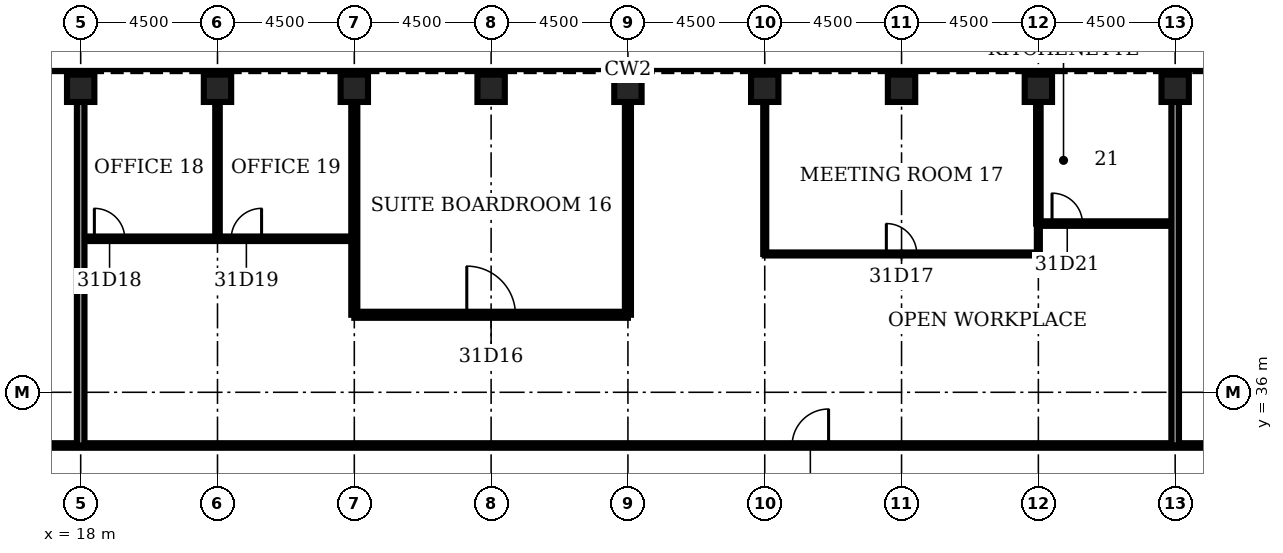
"""IFC4 building model, lengths in metres.
Left out: names, types, materials, properties, quantities, classifications, styles, units other than length and angle.
Written with IfcOpenShell. Run it as: python <this file> out.ifc"""

import sys

from ifc_helpers import new_model, si_unit, direction, frame, frame_2d, origin, origin_2d, place, context, subcontext, project, spatial, rectangle, hollow_rectangle, extrude, element, fill, save


model = new_model("IFC4")
c1 = context("Model", 3, precision=1e-05, world=origin(), true_north=direction((0.0, 1.0)))
c2 = subcontext(c1, "Body", "Model", "MODEL_VIEW")
j1 = project(units=[si_unit("LENGTHUNIT", "METRE"), si_unit("PLANEANGLEUNIT", "RADIAN")], contexts=[c1])
p1 = place(None, origin())
s1 = spatial("IfcSite", under=j1, at=p1, CompositionType="ELEMENT")
p2 = place(p1, origin())
s2 = spatial("IfcBuilding", under=s1, at=p2, CompositionType="ELEMENT")
p3 = place(p2, frame((0.0, 0.0, 142.5)))
s3 = spatial("IfcBuildingStorey", under=s2, at=p3, CompositionType="ELEMENT", Elevation=142.5)
for number, where, z_axis, x_axis in (
    (1, (54.0, 46.0, 0.0), (0.0, 0.0, 1.0), (0.0, 1.0, 0.0)),
    (2, (49.5, 46.0, 0.0), (0.0, 0.0, 1.0), (0.0, 1.0, 0.0)),
    (3, (45.0, 46.0, 0.0), (0.0, 0.0, 1.0), (0.0, 1.0, 0.0)),
    (4, (40.5, 46.0, 0.0), (0.0, 0.0, 1.0), (0.0, 1.0, 0.0)),
    (5, (36.0, 46.0, 0.0), (0.0, 0.0, 1.0), (0.0, 1.0, 0.0)),
    (6, (31.5, 46.0, 0.0), (0.0, 0.0, 1.0), (0.0, 1.0, 0.0)),
    (7, (27.0, 46.0, 0.0), (0.0, 0.0, 1.0), (0.0, 1.0, 0.0)),
    (8, (22.5, 46.0, 0.0), (0.0, 0.0, 1.0), (0.0, 1.0, 0.0)),
    (9, (18.0, 46.0, 0.0), (0.0, 0.0, 1.0), (0.0, 1.0, 0.0)),
):
    element("IfcColumn", number, at=place(p3, frame(where, z_axis=z_axis, x_axis=x_axis)), inside=s3, PredefinedType="COLUMN", context=c2, shape_type="SweptSolid", body=[
        extrude(hollow_rectangle(XDim=0.9, YDim=0.9, WallThickness=0.1, at=origin_2d()), origin(), (0.0, 0.0, 1.0), 4.2),
    ])
p4 = place(p3, frame((15.15, 34.25, 0.0), z_axis=(0.0, 0.0, 1.0), x_axis=(1.0, 0.0, 0.0)))
e10 = element("IfcWall", 10, at=p4, inside=s3, PredefinedType="PARTITIONING", context=c2, shape_type="SweptSolid", body=[
    extrude(rectangle(XDim=41.7, YDim=0.15, at=frame_2d((20.85, 0.0))), origin(), (0.0, 0.0, 1.0), 3.0),
])
p5 = place(p4, frame((26.25, 0.0, 0.0)))
e11 = element("IfcOpeningElement", 11, at=p5, cuts=e10, PredefinedType="OPENING", context=c2, shape_type="SweptSolid", body=[
    extrude(rectangle(XDim=1.2, YDim=2.1, at=frame_2d((0.6, 1.05))), frame((0.0, 0.085, 0.0), z_axis=(0.0, -1.0, 0.0), x_axis=(1.0, 0.0, 0.0)), (0.0, 0.0, 1.0), 0.17),
])
p6 = place(p3, frame((27.0, 38.55, 0.0), z_axis=(0.0, 0.0, 1.0), x_axis=(1.0, 0.0, 0.0)))
e12 = element("IfcWall", 12, at=p6, inside=s3, PredefinedType="PARTITIONING", context=c2, shape_type="SweptSolid", body=[
    extrude(rectangle(XDim=9.0, YDim=0.2, at=frame_2d((4.5, 0.0))), origin(), (0.0, 0.0, 1.0), 3.0),
])
p7 = place(p6, frame((3.7, 0.0, 0.0)))
e13 = element("IfcOpeningElement", 13, at=p7, cuts=e12, PredefinedType="OPENING", context=c2, shape_type="SweptSolid", body=[
    extrude(rectangle(XDim=1.6, YDim=2.1, at=frame_2d((0.8, 1.05))), frame((0.0, 0.11, 0.0), z_axis=(0.0, -1.0, 0.0), x_axis=(1.0, 0.0, 0.0)), (0.0, 0.0, 1.0), 0.22),
])
p8 = place(p3, frame((40.5, 40.55, 0.0), z_axis=(0.0, 0.0, 1.0), x_axis=(1.0, 0.0, 0.0)))
e14 = element("IfcWall", 14, at=p8, inside=s3, PredefinedType="PARTITIONING", context=c2, shape_type="SweptSolid", body=[
    extrude(rectangle(XDim=9.0, YDim=0.1, at=frame_2d((4.5, 0.0))), origin(), (0.0, 0.0, 1.0), 3.0),
])
p9 = place(p8, frame((4.0, 0.0, 0.0)))
e15 = element("IfcOpeningElement", 15, at=p9, cuts=e14, PredefinedType="OPENING", context=c2, shape_type="SweptSolid", body=[
    extrude(rectangle(XDim=1.0, YDim=2.1, at=frame_2d((0.5, 1.05))), frame((0.0, 0.06, 0.0), z_axis=(0.0, -1.0, 0.0), x_axis=(1.0, 0.0, 0.0)), (0.0, 0.0, 1.0), 0.12),
])
p10 = place(p3, frame((18.0, 41.05, 0.0), z_axis=(0.0, 0.0, 1.0), x_axis=(1.0, 0.0, 0.0)))
e16 = element("IfcWall", 16, at=p10, inside=s3, PredefinedType="PARTITIONING", context=c2, shape_type="SweptSolid", body=[
    extrude(rectangle(XDim=9.0, YDim=0.15, at=frame_2d((4.5, 0.0))), origin(), (0.0, 0.0, 1.0), 3.0),
])
p11 = place(p10, frame((0.45, 0.0, 0.0)))
e17 = element("IfcOpeningElement", 17, at=p11, cuts=e16, PredefinedType="OPENING", context=c2, shape_type="SweptSolid", body=[
    extrude(rectangle(XDim=1.0, YDim=2.1, at=frame_2d((0.5, 1.05))), frame((0.0, 0.085, 0.0), z_axis=(0.0, -1.0, 0.0), x_axis=(1.0, 0.0, 0.0)), (0.0, 0.0, 1.0), 0.17),
])
p12 = place(p10, frame((4.95, 0.0, 0.0)))
e18 = element("IfcOpeningElement", 18, at=p12, cuts=e16, PredefinedType="OPENING", context=c2, shape_type="SweptSolid", body=[
    extrude(rectangle(XDim=1.0, YDim=2.1, at=frame_2d((0.5, 1.05))), frame((0.0, 0.085, 0.0), z_axis=(0.0, -1.0, 0.0), x_axis=(1.0, 0.0, 0.0)), (0.0, 0.0, 1.0), 0.17),
])
p13 = place(p3, frame((49.5, 41.55, 0.0), z_axis=(0.0, 0.0, 1.0), x_axis=(1.0, 0.0, 0.0)))
e19 = element("IfcWall", 19, at=p13, inside=s3, PredefinedType="PARTITIONING", context=c2, shape_type="SweptSolid", body=[
    extrude(rectangle(XDim=4.5, YDim=0.15, at=frame_2d((2.25, 0.0))), origin(), (0.0, 0.0, 1.0), 3.0),
])
p14 = place(p13, frame((0.45, 0.0, 0.0)))
e20 = element("IfcOpeningElement", 20, at=p14, cuts=e19, PredefinedType="OPENING", context=c2, shape_type="SweptSolid", body=[
    extrude(rectangle(XDim=1.0, YDim=2.1, at=frame_2d((0.5, 1.05))), frame((0.0, 0.085, 0.0), z_axis=(0.0, -1.0, 0.0), x_axis=(1.0, 0.0, 0.0)), (0.0, 0.0, 1.0), 0.17),
])
p15 = place(p3, frame((18.0, 34.25, 0.0), z_axis=(0.0, 0.0, 1.0), x_axis=(0.0, 1.0, 0.0)))
e21 = element("IfcWall", 21, at=p15, inside=s3, PredefinedType="PARTITIONING", context=c2, shape_type="SweptSolid", body=[
    extrude(rectangle(XDim=11.3, YDim=0.25, at=frame_2d((5.65, 0.0))), origin(), (0.0, 0.0, 1.0), 3.0),
])
p16 = place(p3, frame((22.5, 41.05, 0.0), z_axis=(0.0, 0.0, 1.0), x_axis=(0.0, 1.0, 0.0)))
e22 = element("IfcWall", 22, at=p16, inside=s3, PredefinedType="PARTITIONING", context=c2, shape_type="SweptSolid", body=[
    extrude(rectangle(XDim=4.5, YDim=0.15, at=frame_2d((2.25, 0.0))), origin(), (0.0, 0.0, 1.0), 3.0),
])
for number, where, z_axis, x_axis in (
    (23, (27.0, 38.55, 0.0), (0.0, 0.0, 1.0), (0.0, 1.0, 0.0)),
    (24, (36.0, 38.55, 0.0), (0.0, 0.0, 1.0), (0.0, 1.0, 0.0)),
):
    element("IfcWall", number, at=place(p3, frame(where, z_axis=z_axis, x_axis=x_axis)), inside=s3, PredefinedType="PARTITIONING", context=c2, shape_type="SweptSolid", body=[
        extrude(rectangle(XDim=7.0, YDim=0.2, at=frame_2d((3.5, 0.0))), origin(), (0.0, 0.0, 1.0), 3.0),
    ])
p17 = place(p3, frame((40.5, 40.55, 0.0), z_axis=(0.0, 0.0, 1.0), x_axis=(0.0, 1.0, 0.0)))
e25 = element("IfcWall", 25, at=p17, inside=s3, PredefinedType="PARTITIONING", context=c2, shape_type="SweptSolid", body=[
    extrude(rectangle(XDim=5.0, YDim=0.1, at=frame_2d((2.5, 0.0))), origin(), (0.0, 0.0, 1.0), 3.0),
])
p18 = place(p3, frame((49.5, 40.55, 0.0), z_axis=(0.0, 0.0, 1.0), x_axis=(0.0, 1.0, 0.0)))
e26 = element("IfcWall", 26, at=p18, inside=s3, PredefinedType="PARTITIONING", context=c2, shape_type="SweptSolid", body=[
    extrude(rectangle(XDim=1.0, YDim=0.1, at=frame_2d((0.5, 0.0))), origin(), (0.0, 0.0, 1.0), 3.0),
])
p19 = place(p3, frame((49.5, 41.55, 0.0), z_axis=(0.0, 0.0, 1.0), x_axis=(0.0, 1.0, 0.0)))
e27 = element("IfcWall", 27, at=p19, inside=s3, PredefinedType="PARTITIONING", context=c2, shape_type="SweptSolid", body=[
    extrude(rectangle(XDim=4.0, YDim=0.15, at=frame_2d((2.0, 0.0))), origin(), (0.0, 0.0, 1.0), 3.0),
])
p20 = place(p3, frame((54.0, 34.25, 0.0), z_axis=(0.0, 0.0, 1.0), x_axis=(0.0, 1.0, 0.0)))
e28 = element("IfcWall", 28, at=p20, inside=s3, PredefinedType="PARTITIONING", context=c2, shape_type="SweptSolid", body=[
    extrude(rectangle(XDim=11.3, YDim=0.25, at=frame_2d((5.65, 0.0))), origin(), (0.0, 0.0, 1.0), 3.0),
])
p21 = place(p7, origin())
e29 = element("IfcDoor", 29, at=p21, inside=s3, OperationType="SINGLE_SWING_LEFT", PredefinedType="DOOR", context=c2, shape_type="SweptSolid", body=[
    extrude(rectangle(XDim=1.6, YDim=2.1, at=frame_2d((0.8, 1.05))), frame((0.0, 0.025, 0.0), z_axis=(0.0, -1.0, 0.0), x_axis=(1.0, 0.0, 0.0)), (0.0, 0.0, 1.0), 0.05),
])
fill(e13, e29)
p22 = place(p9, origin())
e30 = element("IfcDoor", 30, at=p22, inside=s3, OperationType="SINGLE_SWING_LEFT", PredefinedType="DOOR", context=c2, shape_type="SweptSolid", body=[
    extrude(rectangle(XDim=1.0, YDim=2.1, at=frame_2d((0.5, 1.05))), frame((0.0, 0.025, 0.0), z_axis=(0.0, -1.0, 0.0), x_axis=(1.0, 0.0, 0.0)), (0.0, 0.0, 1.0), 0.05),
])
fill(e15, e30)
p23 = place(p11, origin())
e31 = element("IfcDoor", 31, at=p23, inside=s3, OperationType="SINGLE_SWING_LEFT", PredefinedType="DOOR", context=c2, shape_type="SweptSolid", body=[
    extrude(rectangle(XDim=1.0, YDim=2.1, at=frame_2d((0.5, 1.05))), frame((0.0, 0.025, 0.0), z_axis=(0.0, -1.0, 0.0), x_axis=(1.0, 0.0, 0.0)), (0.0, 0.0, 1.0), 0.05),
])
fill(e17, e31)
p24 = place(p12, origin())
e32 = element("IfcDoor", 32, at=p24, inside=s3, OperationType="SINGLE_SWING_RIGHT", PredefinedType="DOOR", context=c2, shape_type="SweptSolid", body=[
    extrude(rectangle(XDim=1.0, YDim=2.1, at=frame_2d((0.5, 1.05))), frame((0.0, 0.025, 0.0), z_axis=(0.0, -1.0, 0.0), x_axis=(1.0, 0.0, 0.0)), (0.0, 0.0, 1.0), 0.05),
])
fill(e18, e32)
p25 = place(p14, origin())
e33 = element("IfcDoor", 33, at=p25, inside=s3, OperationType="SINGLE_SWING_LEFT", PredefinedType="DOOR", context=c2, shape_type="SweptSolid", body=[
    extrude(rectangle(XDim=1.0, YDim=2.1, at=frame_2d((0.5, 1.05))), frame((0.0, 0.025, 0.0), z_axis=(0.0, -1.0, 0.0), x_axis=(1.0, 0.0, 0.0)), (0.0, 0.0, 1.0), 0.05),
])
fill(e20, e33)
p26 = place(p5, origin())
e34 = element("IfcDoor", 34, at=p26, inside=s3, OperationType="SINGLE_SWING_RIGHT", PredefinedType="DOOR", context=c2, shape_type="SweptSolid", body=[
    extrude(rectangle(XDim=1.2, YDim=2.1, at=frame_2d((0.6, 1.05))), frame((0.0, 0.025, 0.0), z_axis=(0.0, -1.0, 0.0), x_axis=(1.0, 0.0, 0.0)), (0.0, 0.0, 1.0), 0.05),
])
fill(e11, e34)
save(model, sys.argv[1])
